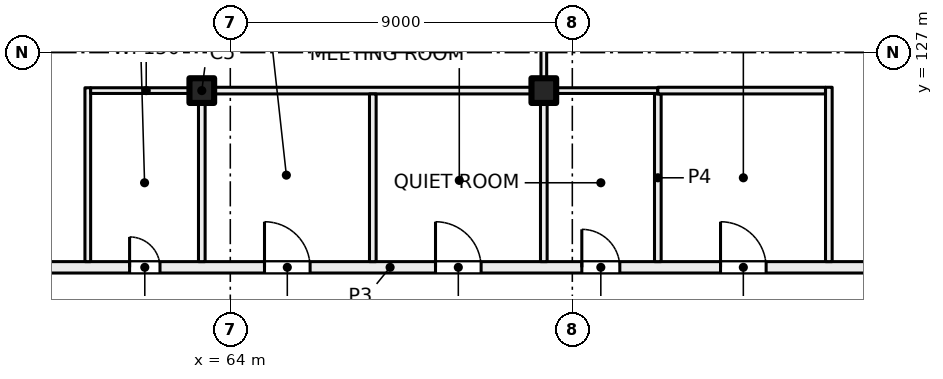
"""IFC4 building model, lengths in metres.
Left out: names, types, materials, properties, quantities, classifications, styles, units other than length and angle.
Written with IfcOpenShell. Run it as: python <this file> out.ifc"""

import sys

from ifc_helpers import new_model, si_unit, direction, frame, frame_2d, origin, origin_2d, place, context, subcontext, project, spatial, rectangle, extrude, element, fill, save


model = new_model("IFC4")
c1 = context("Model", 3, precision=1e-05, world=origin(), true_north=direction((0.0, 1.0)))
c2 = subcontext(c1, "Body", "Model", "MODEL_VIEW")
j1 = project(units=[si_unit("LENGTHUNIT", "METRE"), si_unit("PLANEANGLEUNIT", "RADIAN")], contexts=[c1])
p1 = place(None, origin())
s1 = spatial("IfcSite", under=j1, at=p1, CompositionType="ELEMENT")
p2 = place(p1, origin())
s2 = spatial("IfcBuilding", under=s1, at=p2, CompositionType="ELEMENT")
p3 = place(p2, frame((0.0, 0.0, 154.5)))
s3 = spatial("IfcBuildingStorey", under=s2, at=p3, CompositionType="ELEMENT", Elevation=154.5)
for number, where, z_axis, x_axis in (
    (1, (63.25, 126.0, 0.0), (0.0, 0.0, 1.0), (1.0, 0.0, 0.0)),
    (2, (72.25, 126.0, 0.0), (0.0, 0.0, 1.0), (1.0, 0.0, 0.0)),
):
    element("IfcColumn", number, at=place(p3, frame(where, z_axis=z_axis, x_axis=x_axis)), inside=s3, PredefinedType="COLUMN", context=c2, shape_type="SweptSolid", body=[
        extrude(rectangle(XDim=0.65, YDim=0.65, at=origin_2d()), origin(), (0.0, 0.0, 1.0), 4.0),
    ])
p4 = place(p3, frame((50.657, 121.35, 0.0), z_axis=(0.0, 0.0, 1.0), x_axis=(1.0, 0.0, 0.0)))
e3 = element("IfcWall", 3, at=p4, inside=s3, PredefinedType="PARTITIONING", context=c2, shape_type="SweptSolid", body=[
    extrude(rectangle(XDim=35.096, YDim=0.3, at=frame_2d((17.548, 0.0))), origin(), (0.0, 0.0, 1.0), 3.625),
])
p5 = place(p4, frame((26.243, 0.0, 0.0)))
e4 = element("IfcOpeningElement", 4, at=p5, cuts=e3, PredefinedType="OPENING", context=c2, shape_type="SweptSolid", body=[
    extrude(rectangle(XDim=1.2, YDim=2.1, at=frame_2d((0.6, 1.05))), frame((0.0, 0.16, 0.0), z_axis=(0.0, -1.0, 0.0), x_axis=(1.0, 0.0, 0.0)), (0.0, 0.0, 1.0), 0.32),
])
p6 = place(p4, frame((22.593, 0.0, 0.0)))
e5 = element("IfcOpeningElement", 5, at=p6, cuts=e3, PredefinedType="OPENING", context=c2, shape_type="SweptSolid", body=[
    extrude(rectangle(XDim=1.0, YDim=2.1, at=frame_2d((0.5, 1.05))), frame((0.0, 0.16, 0.0), z_axis=(0.0, -1.0, 0.0), x_axis=(1.0, 0.0, 0.0)), (0.0, 0.0, 1.0), 0.32),
])
p7 = place(p4, frame((31.193, 0.0, 0.0)))
e6 = element("IfcOpeningElement", 6, at=p7, cuts=e3, PredefinedType="OPENING", context=c2, shape_type="SweptSolid", body=[
    extrude(rectangle(XDim=1.8, YDim=2.1, at=frame_2d((0.9, 1.05))), frame((0.0, 0.16, 0.0), z_axis=(0.0, -1.0, 0.0), x_axis=(1.0, 0.0, 0.0)), (0.0, 0.0, 1.0), 0.32),
])
p8 = place(p4, frame((18.743, 0.0, 0.0)))
e7 = element("IfcOpeningElement", 7, at=p8, cuts=e3, PredefinedType="OPENING", context=c2, shape_type="SweptSolid", body=[
    extrude(rectangle(XDim=1.2, YDim=2.1, at=frame_2d((0.6, 1.05))), frame((0.0, 0.16, 0.0), z_axis=(0.0, -1.0, 0.0), x_axis=(1.0, 0.0, 0.0)), (0.0, 0.0, 1.0), 0.32),
])
p9 = place(p4, frame((14.243, 0.0, 0.0)))
e8 = element("IfcOpeningElement", 8, at=p9, cuts=e3, PredefinedType="OPENING", context=c2, shape_type="SweptSolid", body=[
    extrude(rectangle(XDim=1.2, YDim=2.1, at=frame_2d((0.6, 1.05))), frame((0.0, 0.16, 0.0), z_axis=(0.0, -1.0, 0.0), x_axis=(1.0, 0.0, 0.0)), (0.0, 0.0, 1.0), 0.32),
])
p10 = place(p4, frame((10.693, 0.0, 0.0)))
e9 = element("IfcOpeningElement", 9, at=p10, cuts=e3, PredefinedType="OPENING", context=c2, shape_type="SweptSolid", body=[
    extrude(rectangle(XDim=0.8, YDim=2.1, at=frame_2d((0.4, 1.05))), frame((0.0, 0.16, 0.0), z_axis=(0.0, -1.0, 0.0), x_axis=(1.0, 0.0, 0.0)), (0.0, 0.0, 1.0), 0.32),
])
p11 = place(p4, frame((5.693, 0.0, 0.0)))
e10 = element("IfcOpeningElement", 10, at=p11, cuts=e3, PredefinedType="OPENING", context=c2, shape_type="SweptSolid", body=[
    extrude(rectangle(XDim=1.8, YDim=2.1, at=frame_2d((0.9, 1.05))), frame((0.0, 0.16, 0.0), z_axis=(0.0, -1.0, 0.0), x_axis=(1.0, 0.0, 0.0)), (0.0, 0.0, 1.0), 0.32),
])
p12 = place(p4, frame((0.896, 0.0, 0.0)))
e11 = element("IfcOpeningElement", 11, at=p12, cuts=e3, PredefinedType="OPENING", context=c2, shape_type="SweptSolid", body=[
    extrude(rectangle(XDim=1.8, YDim=2.1, at=frame_2d((0.9, 1.05))), frame((0.0, 0.16, 0.0), z_axis=(0.0, -1.0, 0.0), x_axis=(1.0, 0.0, 0.0)), (0.0, 0.0, 1.0), 0.32),
])
p13 = place(p3, frame((60.25, 126.075, 0.0), z_axis=(0.0, 0.0, 1.0), x_axis=(0.0, -1.0, 0.0)))
e12 = element("IfcWall", 12, at=p13, inside=s3, PredefinedType="PARTITIONING", context=c2, shape_type="SweptSolid", body=[
    extrude(rectangle(XDim=4.575, YDim=0.15, at=frame_2d((2.288, 0.0))), origin(), (0.0, 0.0, 1.0), 3.625),
])
p14 = place(p3, frame((63.25, 121.5, 0.0), z_axis=(0.0, 0.0, 1.0), x_axis=(0.0, 1.0, 0.0)))
e13 = element("IfcWall", 13, at=p14, inside=s3, PredefinedType="PARTITIONING", context=c2, shape_type="SweptSolid", body=[
    extrude(rectangle(XDim=4.412, YDim=0.175, at=frame_2d((2.206, 0.0))), origin(), (0.0, 0.0, 1.0), 3.625),
])
p15 = place(p3, frame((63.25, 126.0, 0.0), z_axis=(0.0, 0.0, 1.0), x_axis=(-1.0, 0.0, 0.0)))
e14 = element("IfcWall", 14, at=p15, inside=s3, PredefinedType="PARTITIONING", context=c2, shape_type="SweptSolid", body=[
    extrude(rectangle(XDim=2.925, YDim=0.15, at=frame_2d((1.462, 0.0))), origin(), (0.0, 0.0, 1.0), 3.625),
])
p16 = place(p3, frame((63.25, 126.0, 0.0), z_axis=(0.0, 0.0, 1.0), x_axis=(1.0, 0.0, 0.0)))
e15 = element("IfcWall", 15, at=p16, inside=s3, PredefinedType="PARTITIONING", context=c2, shape_type="SweptSolid", body=[
    extrude(rectangle(XDim=9.0, YDim=0.175, at=frame_2d((4.5, 0.0))), origin(), (0.0, 0.0, 1.0), 3.625),
])
p17 = place(p3, frame((67.75, 121.5, 0.0), z_axis=(0.0, 0.0, 1.0), x_axis=(0.0, 1.0, 0.0)))
e16 = element("IfcWall", 16, at=p17, inside=s3, PredefinedType="PARTITIONING", context=c2, shape_type="SweptSolid", body=[
    extrude(rectangle(XDim=4.412, YDim=0.175, at=frame_2d((2.206, 0.0))), origin(), (0.0, 0.0, 1.0), 3.625),
])
p18 = place(p3, frame((72.25, 121.5, 0.0), z_axis=(0.0, 0.0, 1.0), x_axis=(0.0, 1.0, 0.0)))
e17 = element("IfcWall", 17, at=p18, inside=s3, PredefinedType="PARTITIONING", context=c2, shape_type="SweptSolid", body=[
    extrude(rectangle(XDim=4.5, YDim=0.175, at=frame_2d((2.25, 0.0))), origin(), (0.0, 0.0, 1.0), 3.625),
])
p19 = place(p3, frame((72.25, 126.0, 0.0), z_axis=(0.0, 0.0, 1.0), x_axis=(0.0, 1.0, 0.0)))
e18 = element("IfcWall", 18, at=p19, inside=s3, PredefinedType="PARTITIONING", context=c2, shape_type="SweptSolid", body=[
    extrude(rectangle(XDim=3.9, YDim=0.15, at=frame_2d((1.95, 0.0))), origin(), (0.0, 0.0, 1.0), 3.625),
])
p20 = place(p3, frame((75.25, 126.0, 0.0), z_axis=(0.0, 0.0, 1.0), x_axis=(-1.0, 0.0, 0.0)))
e19 = element("IfcWall", 19, at=p20, inside=s3, PredefinedType="PARTITIONING", context=c2, shape_type="SweptSolid", body=[
    extrude(rectangle(XDim=3.0, YDim=0.15, at=frame_2d((1.5, 0.0))), origin(), (0.0, 0.0, 1.0), 3.625),
])
p21 = place(p3, frame((75.25, 125.912, 0.0), z_axis=(0.0, 0.0, 1.0), x_axis=(0.0, -1.0, 0.0)))
e20 = element("IfcWall", 20, at=p21, inside=s3, PredefinedType="PARTITIONING", context=c2, shape_type="SweptSolid", body=[
    extrude(rectangle(XDim=4.412, YDim=0.175, at=frame_2d((2.206, 0.0))), origin(), (0.0, 0.0, 1.0), 3.625),
])
p22 = place(p3, frame((79.75, 121.5, 0.0), z_axis=(0.0, 0.0, 1.0), x_axis=(0.0, 1.0, 0.0)))
e21 = element("IfcWall", 21, at=p22, inside=s3, PredefinedType="PARTITIONING", context=c2, shape_type="SweptSolid", body=[
    extrude(rectangle(XDim=4.588, YDim=0.175, at=frame_2d((2.294, 0.0))), origin(), (0.0, 0.0, 1.0), 3.625),
])
p23 = place(p3, frame((79.662, 126.0, 0.0), z_axis=(0.0, 0.0, 1.0), x_axis=(-1.0, 0.0, 0.0)))
e22 = element("IfcWall", 22, at=p23, inside=s3, PredefinedType="PARTITIONING", context=c2, shape_type="SweptSolid", body=[
    extrude(rectangle(XDim=4.412, YDim=0.175, at=frame_2d((2.206, 0.0))), origin(), (0.0, 0.0, 1.0), 3.625),
])
p24 = place(p5, origin())
e23 = element("IfcDoor", 23, at=p24, inside=s3, OperationType="DOUBLE_DOOR_SINGLE_SWING", PredefinedType="DOOR", context=c2, shape_type="SweptSolid", body=[
    extrude(rectangle(XDim=1.2, YDim=2.1, at=frame_2d((0.6, 1.05))), frame((0.0, 0.025, 0.0), z_axis=(0.0, -1.0, 0.0), x_axis=(1.0, 0.0, 0.0)), (0.0, 0.0, 1.0), 0.05),
])
fill(e4, e23)
p25 = place(p6, origin())
e24 = element("IfcDoor", 24, at=p25, inside=s3, OperationType="SINGLE_SWING_LEFT", PredefinedType="DOOR", context=c2, shape_type="SweptSolid", body=[
    extrude(rectangle(XDim=1.0, YDim=2.1, at=frame_2d((0.5, 1.05))), frame((0.0, 0.025, 0.0), z_axis=(0.0, -1.0, 0.0), x_axis=(1.0, 0.0, 0.0)), (0.0, 0.0, 1.0), 0.05),
])
fill(e5, e24)
p26 = place(p8, origin())
e25 = element("IfcDoor", 25, at=p26, inside=s3, OperationType="DOUBLE_DOOR_SINGLE_SWING", PredefinedType="DOOR", context=c2, shape_type="SweptSolid", body=[
    extrude(rectangle(XDim=1.2, YDim=2.1, at=frame_2d((0.6, 1.05))), frame((0.0, 0.025, 0.0), z_axis=(0.0, -1.0, 0.0), x_axis=(1.0, 0.0, 0.0)), (0.0, 0.0, 1.0), 0.05),
])
fill(e7, e25)
p27 = place(p9, origin())
e26 = element("IfcDoor", 26, at=p27, inside=s3, OperationType="DOUBLE_DOOR_SINGLE_SWING", PredefinedType="DOOR", context=c2, shape_type="SweptSolid", body=[
    extrude(rectangle(XDim=1.2, YDim=2.1, at=frame_2d((0.6, 1.05))), frame((0.0, 0.025, 0.0), z_axis=(0.0, -1.0, 0.0), x_axis=(1.0, 0.0, 0.0)), (0.0, 0.0, 1.0), 0.05),
])
fill(e8, e26)
p28 = place(p10, origin())
e27 = element("IfcDoor", 27, at=p28, inside=s3, OperationType="SINGLE_SWING_LEFT", PredefinedType="DOOR", context=c2, shape_type="SweptSolid", body=[
    extrude(rectangle(XDim=0.8, YDim=2.1, at=frame_2d((0.4, 1.05))), frame((0.0, 0.025, 0.0), z_axis=(0.0, -1.0, 0.0), x_axis=(1.0, 0.0, 0.0)), (0.0, 0.0, 1.0), 0.05),
])
fill(e9, e27)
save(model, sys.argv[1])
